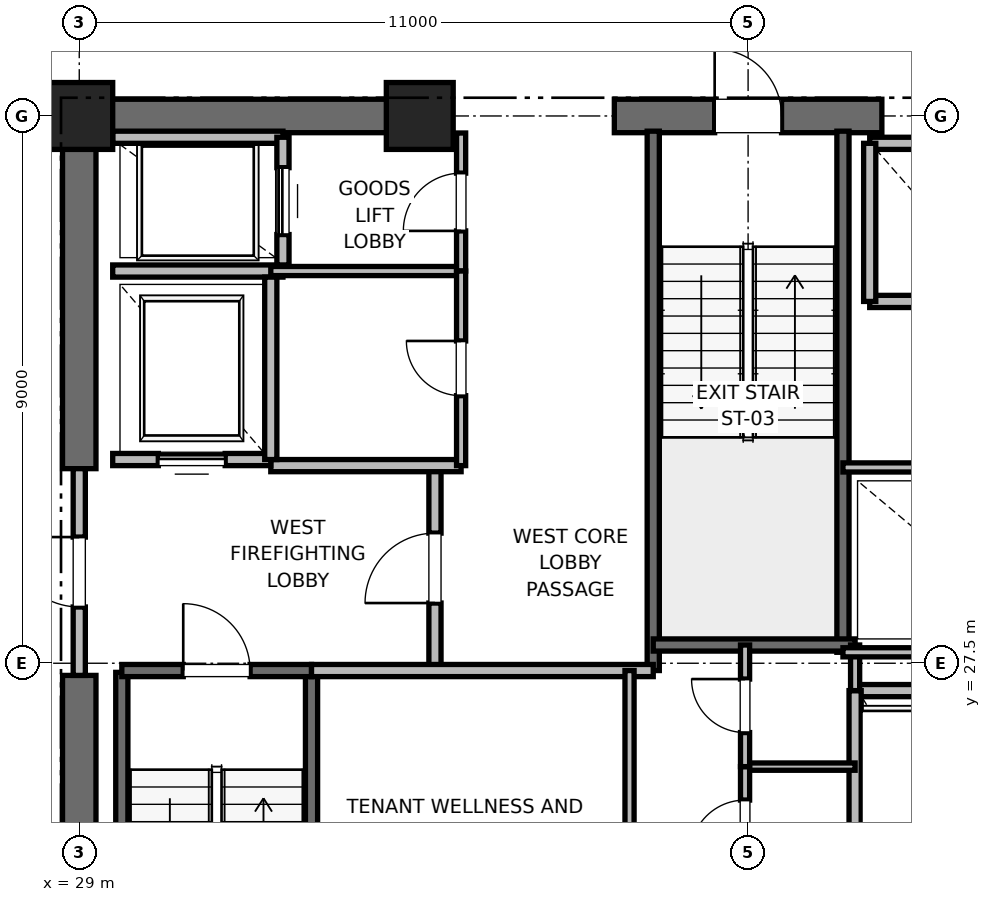
"""IFC4 building model, lengths in metres.
Left out: names, types, materials, properties, quantities, classifications, styles, units other than length and angle.
Written with IfcOpenShell. Run it as: python <this file> out.ifc"""

import sys

from ifc_helpers import new_model, si_unit, direction, frame, frame_2d, origin, origin_2d, place, context, subcontext, project, spatial, rectangle, extrude, element, fill, save


model = new_model("IFC4")
c1 = context("Model", 3, precision=1e-05, world=origin(), true_north=direction((0.0, 1.0)))
c2 = subcontext(c1, "Body", "Model", "MODEL_VIEW")
j1 = project(units=[si_unit("LENGTHUNIT", "METRE"), si_unit("PLANEANGLEUNIT", "RADIAN")], contexts=[c1])
p1 = place(None, origin())
s1 = spatial("IfcSite", under=j1, at=p1, CompositionType="ELEMENT")
p2 = place(p1, origin())
s2 = spatial("IfcBuilding", under=s1, at=p2, CompositionType="ELEMENT")
p3 = place(p2, frame((0.0, 0.0, 140.4)))
s3 = spatial("IfcBuildingStorey", under=s2, at=p3, CompositionType="ELEMENT", Elevation=140.4)
for number, where, z_axis, x_axis in (
    (1, (29.0, 36.5, 0.0), (0.0, 0.0, 1.0), (1.0, 0.0, 0.0)),
    (2, (34.6, 36.5, 0.0), (0.0, 0.0, 1.0), (1.0, 0.0, 0.0)),
):
    element("IfcColumn", number, at=place(p3, frame(where, z_axis=z_axis, x_axis=x_axis)), inside=s3, PredefinedType="PILASTER", context=c2, shape_type="SweptSolid", body=[
        extrude(rectangle(XDim=1.1, YDim=1.1, at=origin_2d()), origin(), (0.0, 0.0, 1.0), 4.0),
    ])
p4 = place(p3, frame((29.0, 36.5, 0.0), z_axis=(0.0, 0.0, 1.0), x_axis=(1.0, 0.0, 0.0)))
e3 = element("IfcWall", 3, at=p4, inside=s3, PredefinedType="SHEAR", context=c2, shape_type="SweptSolid", body=[
    extrude(rectangle(XDim=5.8, YDim=0.55, at=frame_2d((2.9, 0.0))), origin(), (0.0, 0.0, 1.0), 3.775),
])
p5 = place(p3, frame((37.8, 36.5, 0.0), z_axis=(0.0, 0.0, 1.0), x_axis=(1.0, 0.0, 0.0)))
e4 = element("IfcWall", 4, at=p5, inside=s3, PredefinedType="SHEAR", context=c2, shape_type="SweptSolid", body=[
    extrude(rectangle(XDim=4.4, YDim=0.55, at=frame_2d((2.2, 0.0))), origin(), (0.0, 0.0, 1.0), 3.775),
])
p6 = place(p5, frame((1.65, 0.0, 0.0)))
e5 = element("IfcOpeningElement", 5, at=p6, cuts=e4, PredefinedType="OPENING", context=c2, shape_type="SweptSolid", body=[
    extrude(rectangle(XDim=1.1, YDim=2.15, at=frame_2d((0.55, 1.075))), frame((0.0, 0.275, 0.0), z_axis=(0.0, -1.0, 0.0), x_axis=(1.0, 0.0, 0.0)), (0.0, 0.0, 1.0), 0.55),
])
p7 = place(p3, frame((29.0, 18.5, 0.0), z_axis=(0.0, 0.0, 1.0), x_axis=(0.0, 1.0, 0.0)))
e6 = element("IfcWall", 6, at=p7, inside=s3, PredefinedType="SHEAR", context=c2, shape_type="SweptSolid", body=[
    extrude(rectangle(XDim=8.8, YDim=0.55, at=frame_2d((4.4, 0.0))), origin(), (0.0, 0.0, 1.0), 3.775),
])
p8 = place(p3, frame((29.0, 30.7, 0.0), z_axis=(0.0, 0.0, 1.0), x_axis=(0.0, 1.0, 0.0)))
e7 = element("IfcWall", 7, at=p8, inside=s3, PredefinedType="SHEAR", context=c2, shape_type="SweptSolid", body=[
    extrude(rectangle(XDim=5.8, YDim=0.55, at=frame_2d((2.9, 0.0))), origin(), (0.0, 0.0, 1.0), 3.775),
])
p9 = place(p3, frame((29.7, 19.2, 0.0), z_axis=(0.0, 0.0, 1.0), x_axis=(0.0, 1.0, 0.0)))
e8 = element("IfcWall", 8, at=p9, inside=s3, PredefinedType="SOLIDWALL", context=c2, shape_type="SweptSolid", body=[
    extrude(rectangle(XDim=8.15, YDim=0.2, at=frame_2d((4.075, 0.0))), origin(), (0.0, 0.0, 1.0), 3.775),
])
p10 = place(p3, frame((32.82, 18.6, 0.0), z_axis=(0.0, 0.0, 1.0), x_axis=(0.0, 1.0, 0.0)))
e9 = element("IfcWall", 9, at=p10, inside=s3, PredefinedType="SOLIDWALL", context=c2, shape_type="SweptSolid", body=[
    extrude(rectangle(XDim=8.78, YDim=0.2, at=frame_2d((4.39, 0.0))), origin(), (0.0, 0.0, 1.0), 3.775),
])
p11 = place(p3, frame((29.7, 27.38, 0.0), z_axis=(0.0, 0.0, 1.0), x_axis=(1.0, 0.0, 0.0)))
e10 = element("IfcWall", 10, at=p11, inside=s3, PredefinedType="SOLIDWALL", context=c2, shape_type="SweptSolid", body=[
    extrude(rectangle(XDim=3.12, YDim=0.2, at=frame_2d((1.56, 0.0))), origin(), (0.0, 0.0, 1.0), 3.775),
])
p12 = place(p11, frame((1.01, 0.0, 0.0)))
e11 = element("IfcOpeningElement", 11, at=p12, cuts=e10, PredefinedType="OPENING", context=c2, shape_type="SweptSolid", body=[
    extrude(rectangle(XDim=1.1, YDim=2.15, at=frame_2d((0.55, 1.075))), frame((0.0, 0.1, 0.0), z_axis=(0.0, -1.0, 0.0), x_axis=(1.0, 0.0, 0.0)), (0.0, 0.0, 1.0), 0.2),
])
p13 = place(p3, frame((38.44, 27.38, 0.0), z_axis=(0.0, 0.0, 1.0), x_axis=(0.0, 1.0, 0.0)))
e12 = element("IfcWall", 12, at=p13, inside=s3, PredefinedType="SOLIDWALL", context=c2, shape_type="SweptSolid", body=[
    extrude(rectangle(XDim=8.87, YDim=0.2, at=frame_2d((4.435, 0.0))), origin(), (0.0, 0.0, 1.0), 3.775),
])
p14 = place(p3, frame((41.56, 27.68, 0.0), z_axis=(0.0, 0.0, 1.0), x_axis=(0.0, 1.0, 0.0)))
e13 = element("IfcWall", 13, at=p14, inside=s3, PredefinedType="SOLIDWALL", context=c2, shape_type="SweptSolid", body=[
    extrude(rectangle(XDim=8.57, YDim=0.2, at=frame_2d((4.285, 0.0))), origin(), (0.0, 0.0, 1.0), 3.775),
])
p15 = place(p3, frame((38.44, 27.8, 0.0), z_axis=(0.0, 0.0, 1.0), x_axis=(1.0, 0.0, 0.0)))
e14 = element("IfcWall", 14, at=p15, inside=s3, PredefinedType="SOLIDWALL", context=c2, shape_type="SweptSolid", body=[
    extrude(rectangle(XDim=3.32, YDim=0.2, at=frame_2d((1.66, 0.0))), origin(), (0.0, 0.0, 1.0), 3.775),
])
p16 = place(p3, frame((34.85, 27.38, 0.0), z_axis=(0.0, 0.0, 1.0), x_axis=(0.0, 1.0, 0.0)))
e15 = element("IfcWall", 15, at=p16, inside=s3, PredefinedType="PARTITIONING", context=c2, shape_type="SweptSolid", body=[
    extrude(rectangle(XDim=3.37, YDim=0.2, at=frame_2d((1.685, 0.0))), origin(), (0.0, 0.0, 1.0), 3.775),
])
p17 = place(p16, frame((1.11, 0.0, 0.0)))
e16 = element("IfcOpeningElement", 16, at=p17, cuts=e15, PredefinedType="OPENING", context=c2, shape_type="SweptSolid", body=[
    extrude(rectangle(XDim=1.15, YDim=2.2, at=frame_2d((0.575, 1.1))), frame((0.0, 0.1, 0.0), z_axis=(0.0, -1.0, 0.0), x_axis=(1.0, 0.0, 0.0)), (0.0, 0.0, 1.0), 0.2),
])
p18 = place(p3, frame((29.0, 27.3, 0.0), z_axis=(0.0, 0.0, 1.0), x_axis=(0.0, 1.0, 0.0)))
e17 = element("IfcWall", 17, at=p18, inside=s3, PredefinedType="PARTITIONING", context=c2, shape_type="SweptSolid", body=[
    extrude(rectangle(XDim=3.4, YDim=0.2, at=frame_2d((1.7, 0.0))), origin(), (0.0, 0.0, 1.0), 2.755),
])
p19 = place(p18, frame((1.125, 0.0, 0.0)))
e18 = element("IfcOpeningElement", 18, at=p19, cuts=e17, PredefinedType="OPENING", context=c2, shape_type="SweptSolid", body=[
    extrude(rectangle(XDim=1.15, YDim=2.2, at=frame_2d((0.575, 1.1))), frame((0.0, 0.1, 0.0), z_axis=(0.0, -1.0, 0.0), x_axis=(1.0, 0.0, 0.0)), (0.0, 0.0, 1.0), 0.2),
])
p20 = place(p3, frame((32.82, 27.38, 0.0), z_axis=(0.0, 0.0, 1.0), x_axis=(1.0, 0.0, 0.0)))
e19 = element("IfcWall", 19, at=p20, inside=s3, PredefinedType="PARTITIONING", context=c2, shape_type="SweptSolid", body=[
    extrude(rectangle(XDim=5.62, YDim=0.2, at=frame_2d((2.81, 0.0))), origin(), (0.0, 0.0, 1.0), 3.775),
])
p21 = place(p3, frame((32.15, 30.75, 0.0), z_axis=(0.0, 0.0, 1.0), x_axis=(1.0, 0.0, 0.0)))
e20 = element("IfcWall", 20, at=p21, inside=s3, PredefinedType="PARTITIONING", context=c2, shape_type="SweptSolid", body=[
    extrude(rectangle(XDim=3.13, YDim=0.2, at=frame_2d((1.565, 0.0))), origin(), (0.0, 0.0, 1.0), 3.775),
])
p22 = place(p3, frame((29.55, 30.85, 0.0), z_axis=(0.0, 0.0, 1.0), x_axis=(1.0, 0.0, 0.0)))
e21 = element("IfcWall", 21, at=p22, inside=s3, PredefinedType="SOLIDWALL", context=c2, shape_type="SweptSolid", body=[
    extrude(rectangle(XDim=2.6, YDim=0.2, at=frame_2d((1.3, 0.0))), origin(), (0.0, 0.0, 1.0), 2.755),
])
p23 = place(p22, frame((0.75, 0.0, 0.0)))
e22 = element("IfcOpeningElement", 22, at=p23, cuts=e21, PredefinedType="OPENING", context=c2, shape_type="SweptSolid", body=[
    extrude(rectangle(XDim=1.1, YDim=2.2, at=frame_2d((0.55, 1.1))), frame((0.0, 0.1, 0.0), z_axis=(0.0, -1.0, 0.0), x_axis=(1.0, 0.0, 0.0)), (0.0, 0.0, 1.0), 0.2),
])
p24 = place(p3, frame((29.55, 33.95, 0.0), z_axis=(0.0, 0.0, 1.0), x_axis=(1.0, 0.0, 0.0)))
e23 = element("IfcWall", 23, at=p24, inside=s3, PredefinedType="SOLIDWALL", context=c2, shape_type="SweptSolid", body=[
    extrude(rectangle(XDim=2.8, YDim=0.2, at=frame_2d((1.4, 0.0))), origin(), (0.0, 0.0, 1.0), 3.775),
])
p25 = place(p3, frame((32.15, 30.85, 0.0), z_axis=(0.0, 0.0, 1.0), x_axis=(0.0, 1.0, 0.0)))
e24 = element("IfcWall", 24, at=p25, inside=s3, PredefinedType="SOLIDWALL", context=c2, shape_type="SweptSolid", body=[
    extrude(rectangle(XDim=3.0, YDim=0.2, at=frame_2d((1.5, 0.0))), origin(), (0.0, 0.0, 1.0), 3.775),
])
p26 = place(p3, frame((32.35, 36.15, 0.0), z_axis=(0.0, 0.0, 1.0), x_axis=(-1.0, 0.0, 0.0)))
e25 = element("IfcWall", 25, at=p26, inside=s3, PredefinedType="SOLIDWALL", context=c2, shape_type="SweptSolid", body=[
    extrude(rectangle(XDim=2.8, YDim=0.2, at=frame_2d((1.4, 0.0))), origin(), (0.0, 0.0, 1.0), 2.985),
])
p27 = place(p3, frame((32.35, 34.05, 0.0), z_axis=(0.0, 0.0, 1.0), x_axis=(0.0, 1.0, 0.0)))
e26 = element("IfcWall", 26, at=p27, inside=s3, PredefinedType="SOLIDWALL", context=c2, shape_type="SweptSolid", body=[
    extrude(rectangle(XDim=2.1, YDim=0.2, at=frame_2d((1.05, 0.0))), origin(), (0.0, 0.0, 1.0), 3.775),
])
p28 = place(p27, frame((0.5, 0.0, 0.0)))
e27 = element("IfcOpeningElement", 27, at=p28, cuts=e26, PredefinedType="OPENING", context=c2, shape_type="SweptSolid", body=[
    extrude(rectangle(XDim=1.1, YDim=2.2, at=frame_2d((0.55, 1.1))), frame((0.0, 0.1, 0.0), z_axis=(0.0, -1.0, 0.0), x_axis=(1.0, 0.0, 0.0)), (0.0, 0.0, 1.0), 0.2),
])
p29 = place(p3, frame((43.44, 27.05, 0.0), z_axis=(0.0, 0.0, 1.0), x_axis=(-1.0, 0.0, 0.0)))
e28 = element("IfcWall", 28, at=p29, inside=s3, PredefinedType="SOLIDWALL", context=c2, shape_type="SweptSolid", body=[
    extrude(rectangle(XDim=1.68, YDim=0.2, at=frame_2d((0.84, 0.0))), origin(), (0.0, 0.0, 1.0), 3.775),
])
p30 = place(p3, frame((41.76, 27.05, 0.0), z_axis=(0.0, 0.0, 1.0), x_axis=(0.0, -1.0, 0.0)))
e29 = element("IfcWall", 29, at=p30, inside=s3, PredefinedType="SOLIDWALL", context=c2, shape_type="SweptSolid", body=[
    extrude(rectangle(XDim=2.6, YDim=0.2, at=frame_2d((1.3, 0.0))), origin(), (0.0, 0.0, 1.0), 3.775),
])
p31 = place(p3, frame((42.0, 33.45, 0.0), z_axis=(0.0, 0.0, 1.0), x_axis=(1.0, 0.0, 0.0)))
e30 = element("IfcWall", 30, at=p31, inside=s3, PredefinedType="SOLIDWALL", context=c2, shape_type="SweptSolid", body=[
    extrude(rectangle(XDim=2.3, YDim=0.2, at=frame_2d((1.15, 0.0))), origin(), (0.0, 0.0, 1.0), 3.775),
])
p32 = place(p3, frame((44.3, 36.05, 0.0), z_axis=(0.0, 0.0, 1.0), x_axis=(-1.0, 0.0, 0.0)))
e31 = element("IfcWall", 31, at=p32, inside=s3, PredefinedType="SOLIDWALL", context=c2, shape_type="SweptSolid", body=[
    extrude(rectangle(XDim=2.3, YDim=0.2, at=frame_2d((1.15, 0.0))), origin(), (0.0, 0.0, 1.0), 2.755),
])
p33 = place(p3, frame((42.0, 36.05, 0.0), z_axis=(0.0, 0.0, 1.0), x_axis=(0.0, -1.0, 0.0)))
e32 = element("IfcWall", 32, at=p33, inside=s3, PredefinedType="SOLIDWALL", context=c2, shape_type="SweptSolid", body=[
    extrude(rectangle(XDim=2.6, YDim=0.2, at=frame_2d((1.3, 0.0))), origin(), (0.0, 0.0, 1.0), 2.755),
])
p34 = place(p3, frame((39.95, 25.8, 0.0), z_axis=(0.0, 0.0, 1.0), x_axis=(1.0, 0.0, 0.0)))
e33 = element("IfcWall", 33, at=p34, inside=s3, PredefinedType="PARTITIONING", context=c2, shape_type="SweptSolid", body=[
    extrude(rectangle(XDim=1.81, YDim=0.12, at=frame_2d((0.905, 0.0))), origin(), (0.0, 0.0, 1.0), 2.85),
])
p35 = place(p3, frame((41.76, 27.05, 0.0), z_axis=(0.0, 0.0, 1.0), x_axis=(0.0, 1.0, 0.0)))
e34 = element("IfcWall", 34, at=p35, inside=s3, PredefinedType="PARTITIONING", context=c2, shape_type="SweptSolid", body=[
    extrude(rectangle(XDim=0.75, YDim=0.15, at=frame_2d((0.375, 0.0))), origin(), (0.0, 0.0, 1.0), 2.85),
])
p36 = place(p3, frame((39.95, 23.8, 0.0), z_axis=(0.0, 0.0, 1.0), x_axis=(0.0, 1.0, 0.0)))
e35 = element("IfcWall", 35, at=p36, inside=s3, PredefinedType="PARTITIONING", context=c2, shape_type="SweptSolid", body=[
    extrude(rectangle(XDim=2.0, YDim=0.15, at=frame_2d((1.0, 0.0))), origin(), (0.0, 0.0, 1.0), 2.85),
])
p37 = place(p36, frame((0.55, 0.0, 0.0)))
e36 = element("IfcOpeningElement", 36, at=p37, cuts=e35, PredefinedType="OPENING", context=c2, shape_type="SweptSolid", body=[
    extrude(rectangle(XDim=0.9, YDim=2.1, at=frame_2d((0.45, 1.05))), frame((0.0, 0.075, 0.0), z_axis=(0.0, -1.0, 0.0), x_axis=(1.0, 0.0, 0.0)), (0.0, 0.0, 1.0), 0.15),
])
p38 = place(p3, frame((39.95, 25.8, 0.0), z_axis=(0.0, 0.0, 1.0), x_axis=(0.0, 1.0, 0.0)))
e37 = element("IfcWall", 37, at=p38, inside=s3, PredefinedType="PARTITIONING", context=c2, shape_type="SweptSolid", body=[
    extrude(rectangle(XDim=2.0, YDim=0.15, at=frame_2d((1.0, 0.0))), origin(), (0.0, 0.0, 1.0), 2.85),
])
p39 = place(p38, frame((0.56, 0.0, 0.0)))
e38 = element("IfcOpeningElement", 38, at=p39, cuts=e37, PredefinedType="OPENING", context=c2, shape_type="SweptSolid", body=[
    extrude(rectangle(XDim=0.88, YDim=2.1, at=frame_2d((0.44, 1.05))), frame((0.0, 0.075, 0.0), z_axis=(0.0, -1.0, 0.0), x_axis=(1.0, 0.0, 0.0)), (0.0, 0.0, 1.0), 0.15),
])
p40 = place(p3, frame((32.15, 33.95, 0.0), z_axis=(0.0, 0.0, 1.0), x_axis=(1.0, 0.0, 0.0)))
e39 = element("IfcWall", 39, at=p40, inside=s3, PredefinedType="PARTITIONING", context=c2, shape_type="SweptSolid", body=[
    extrude(rectangle(XDim=3.13, YDim=0.15, at=frame_2d((1.565, 0.0))), origin(), (0.0, 0.0, 1.0), 2.85),
])
p41 = place(p3, frame((35.28, 33.95, 0.0), z_axis=(0.0, 0.0, 1.0), x_axis=(0.0, 1.0, 0.0)))
e40 = element("IfcWall", 40, at=p41, inside=s3, PredefinedType="PARTITIONING", context=c2, shape_type="SweptSolid", body=[
    extrude(rectangle(XDim=2.27, YDim=0.15, at=frame_2d((1.135, 0.0))), origin(), (0.0, 0.0, 1.0), 2.755),
])
p42 = place(p41, frame((0.66, 0.0, 0.0)))
e41 = element("IfcOpeningElement", 41, at=p42, cuts=e40, PredefinedType="OPENING", context=c2, shape_type="SweptSolid", body=[
    extrude(rectangle(XDim=0.95, YDim=2.15, at=frame_2d((0.475, 1.075))), frame((0.0, 0.075, 0.0), z_axis=(0.0, -1.0, 0.0), x_axis=(1.0, 0.0, 0.0)), (0.0, 0.0, 1.0), 0.15),
])
p43 = place(p3, frame((35.28, 30.75, 0.0), z_axis=(0.0, 0.0, 1.0), x_axis=(0.0, 1.0, 0.0)))
e42 = element("IfcWall", 42, at=p43, inside=s3, PredefinedType="PARTITIONING", context=c2, shape_type="SweptSolid", body=[
    extrude(rectangle(XDim=3.2, YDim=0.15, at=frame_2d((1.6, 0.0))), origin(), (0.0, 0.0, 1.0), 2.85),
])
p44 = place(p43, frame((1.15, 0.0, 0.0)))
e43 = element("IfcOpeningElement", 43, at=p44, cuts=e42, PredefinedType="OPENING", context=c2, shape_type="SweptSolid", body=[
    extrude(rectangle(XDim=0.9, YDim=2.1, at=frame_2d((0.45, 1.05))), frame((0.0, 0.075, 0.0), z_axis=(0.0, -1.0, 0.0), x_axis=(1.0, 0.0, 0.0)), (0.0, 0.0, 1.0), 0.15),
])
p45 = place(p3, frame((38.05, 18.6, 0.0), z_axis=(0.0, 0.0, 1.0), x_axis=(0.0, 1.0, 0.0)))
e44 = element("IfcWall", 44, at=p45, inside=s3, PredefinedType="PARTITIONING", context=c2, shape_type="SweptSolid", body=[
    extrude(rectangle(XDim=8.78, YDim=0.15, at=frame_2d((4.39, 0.0))), origin(), (0.0, 0.0, 1.0), 2.755),
])
p46 = place(p45, frame((3.89, 0.0, 0.0)))
e45 = element("IfcOpeningElement", 45, at=p46, cuts=e44, PredefinedType="OPENING", context=c2, shape_type="SweptSolid", body=[
    extrude(rectangle(XDim=1.0, YDim=2.15, at=frame_2d((0.5, 1.075))), frame((0.0, 0.075, 0.0), z_axis=(0.0, -1.0, 0.0), x_axis=(1.0, 0.0, 0.0)), (0.0, 0.0, 1.0), 0.15),
])
p47 = place(p3, frame((41.56, 27.68, 0.0), z_axis=(0.0, 0.0, 1.0), x_axis=(1.0, 0.0, 0.0)))
e46 = element("IfcWall", 46, at=p47, inside=s3, PredefinedType="PARTITIONING", context=c2, shape_type="SweptSolid", body=[
    extrude(rectangle(XDim=3.59, YDim=0.15, at=frame_2d((1.795, 0.0))), origin(), (0.0, 0.0, 1.0), 2.85),
])
p48 = place(p3, frame((41.56, 30.72, 0.0), z_axis=(0.0, 0.0, 1.0), x_axis=(1.0, 0.0, 0.0)))
e47 = element("IfcWall", 47, at=p48, inside=s3, PredefinedType="PARTITIONING", context=c2, shape_type="SweptSolid", body=[
    extrude(rectangle(XDim=3.59, YDim=0.15, at=frame_2d((1.795, 0.0))), origin(), (0.0, 0.0, 1.0), 2.85),
])
p49 = place(p48, frame((1.355, 0.0, 0.0)))
e48 = element("IfcOpeningElement", 48, at=p49, cuts=e47, PredefinedType="OPENING", context=c2, shape_type="SweptSolid", body=[
    extrude(rectangle(XDim=0.88, YDim=2.1, at=frame_2d((0.44, 1.05))), frame((0.0, 0.075, 0.0), z_axis=(0.0, -1.0, 0.0), x_axis=(1.0, 0.0, 0.0)), (0.0, 0.0, 1.0), 0.15),
])
p50 = place(p12, origin())
e49 = element("IfcDoor", 49, at=p50, inside=s3, OperationType="SINGLE_SWING_LEFT", PredefinedType="DOOR", context=c2, shape_type="SweptSolid", body=[
    extrude(rectangle(XDim=1.1, YDim=2.15, at=frame_2d((0.55, 1.075))), frame((0.0, 0.025, 0.0), z_axis=(0.0, -1.0, 0.0), x_axis=(1.0, 0.0, 0.0)), (0.0, 0.0, 1.0), 0.05),
])
fill(e11, e49)
p51 = place(p6, origin())
e50 = element("IfcDoor", 50, at=p51, inside=s3, OperationType="SINGLE_SWING_LEFT", PredefinedType="DOOR", context=c2, shape_type="SweptSolid", body=[
    extrude(rectangle(XDim=1.1, YDim=2.15, at=frame_2d((0.55, 1.075))), frame((0.0, 0.025, 0.0), z_axis=(0.0, -1.0, 0.0), x_axis=(1.0, 0.0, 0.0)), (0.0, 0.0, 1.0), 0.05),
])
fill(e5, e50)
p52 = place(p17, origin())
e51 = element("IfcDoor", 51, at=p52, inside=s3, OperationType="SINGLE_SWING_LEFT", PredefinedType="DOOR", context=c2, shape_type="SweptSolid", body=[
    extrude(rectangle(XDim=1.15, YDim=2.2, at=frame_2d((0.575, 1.1))), frame((0.0, 0.025, 0.0), z_axis=(0.0, -1.0, 0.0), x_axis=(1.0, 0.0, 0.0)), (0.0, 0.0, 1.0), 0.05),
])
fill(e16, e51)
p53 = place(p19, origin())
e52 = element("IfcDoor", 52, at=p53, inside=s3, OperationType="SINGLE_SWING_RIGHT", PredefinedType="DOOR", context=c2, shape_type="SweptSolid", body=[
    extrude(rectangle(XDim=1.15, YDim=2.2, at=frame_2d((0.575, 1.1))), frame((0.0, 0.025, 0.0), z_axis=(0.0, -1.0, 0.0), x_axis=(1.0, 0.0, 0.0)), (0.0, 0.0, 1.0), 0.05),
])
fill(e18, e52)
p54 = place(p23, origin())
e53 = element("IfcDoor", 53, at=p54, inside=s3, OperationType="SLIDING_TO_RIGHT", PredefinedType="DOOR", context=c2, shape_type="SweptSolid", body=[
    extrude(rectangle(XDim=1.1, YDim=2.2, at=frame_2d((0.55, 1.1))), frame((0.0, 0.025, 0.0), z_axis=(0.0, -1.0, 0.0), x_axis=(1.0, 0.0, 0.0)), (0.0, 0.0, 1.0), 0.05),
])
fill(e22, e53)
p55 = place(p28, origin())
e54 = element("IfcDoor", 54, at=p55, inside=s3, OperationType="SLIDING_TO_RIGHT", PredefinedType="DOOR", context=c2, shape_type="SweptSolid", body=[
    extrude(rectangle(XDim=1.1, YDim=2.2, at=frame_2d((0.55, 1.1))), frame((0.0, 0.025, 0.0), z_axis=(0.0, -1.0, 0.0), x_axis=(1.0, 0.0, 0.0)), (0.0, 0.0, 1.0), 0.05),
])
fill(e27, e54)
p56 = place(p37, origin())
e55 = element("IfcDoor", 55, at=p56, inside=s3, OperationType="SINGLE_SWING_LEFT", PredefinedType="DOOR", context=c2, shape_type="SweptSolid", body=[
    extrude(rectangle(XDim=0.9, YDim=2.1, at=frame_2d((0.45, 1.05))), frame((0.0, 0.025, 0.0), z_axis=(0.0, -1.0, 0.0), x_axis=(1.0, 0.0, 0.0)), (0.0, 0.0, 1.0), 0.05),
])
fill(e36, e55)
p57 = place(p39, origin())
e56 = element("IfcDoor", 56, at=p57, inside=s3, OperationType="SINGLE_SWING_RIGHT", PredefinedType="DOOR", context=c2, shape_type="SweptSolid", body=[
    extrude(rectangle(XDim=0.88, YDim=2.1, at=frame_2d((0.44, 1.05))), frame((0.0, 0.025, 0.0), z_axis=(0.0, -1.0, 0.0), x_axis=(1.0, 0.0, 0.0)), (0.0, 0.0, 1.0), 0.05),
])
fill(e38, e56)
p58 = place(p42, origin())
e57 = element("IfcDoor", 57, at=p58, inside=s3, OperationType="SINGLE_SWING_LEFT", PredefinedType="DOOR", context=c2, shape_type="SweptSolid", body=[
    extrude(rectangle(XDim=0.95, YDim=2.15, at=frame_2d((0.475, 1.075))), frame((0.0, 0.025, 0.0), z_axis=(0.0, -1.0, 0.0), x_axis=(1.0, 0.0, 0.0)), (0.0, 0.0, 1.0), 0.05),
])
fill(e41, e57)
p59 = place(p44, origin())
e58 = element("IfcDoor", 58, at=p59, inside=s3, OperationType="SINGLE_SWING_RIGHT", PredefinedType="DOOR", context=c2, shape_type="SweptSolid", body=[
    extrude(rectangle(XDim=0.9, YDim=2.1, at=frame_2d((0.45, 1.05))), frame((0.0, 0.025, 0.0), z_axis=(0.0, -1.0, 0.0), x_axis=(1.0, 0.0, 0.0)), (0.0, 0.0, 1.0), 0.05),
])
fill(e43, e58)
save(model, sys.argv[1])
